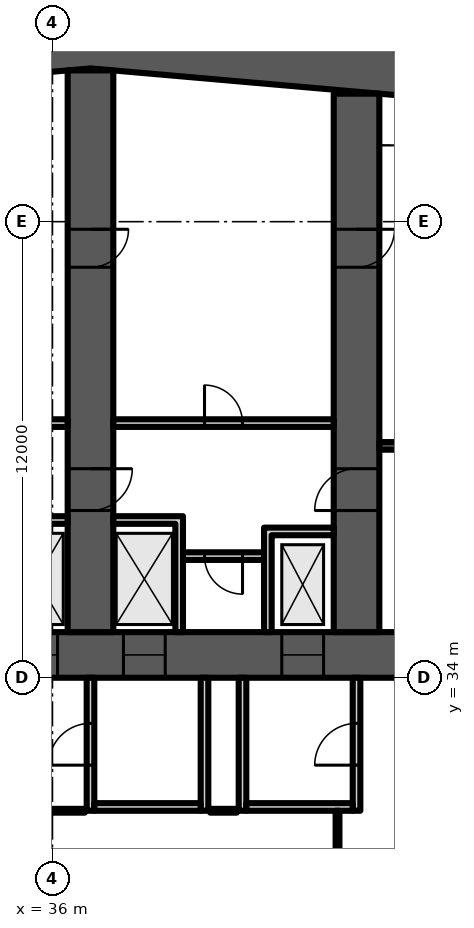
"""IFC4 building model, lengths in metres.
Left out: names, types, materials, properties, quantities, classifications, styles, units other than length and angle.
Written with IfcOpenShell. Run it as: python <this file> out.ifc"""

import sys

from ifc_helpers import new_model, si_unit, direction, frame, frame_2d, origin, place, context, subcontext, project, spatial, polyline, rectangle, outline, extrude, element, fill, save


model = new_model("IFC4")
c1 = context("Model", 3, precision=1e-05, world=origin(), true_north=direction((0.0, 1.0)))
c2 = subcontext(c1, "Body", "Model", "MODEL_VIEW")
j1 = project(units=[si_unit("LENGTHUNIT", "METRE"), si_unit("PLANEANGLEUNIT", "RADIAN")], contexts=[c1])
p1 = place(None, origin())
s1 = spatial("IfcSite", under=j1, at=p1, CompositionType="ELEMENT")
p2 = place(p1, origin())
s2 = spatial("IfcBuilding", under=s1, at=p2, CompositionType="ELEMENT")
p3 = place(p2, frame((0.0, 0.0, 88.3)))
s3 = spatial("IfcBuildingStorey", under=s2, at=p3, CompositionType="ELEMENT", Elevation=88.3)
p4 = place(p3, frame((0.0, 0.0, -0.0)))
e1 = element("IfcWall", 1, at=p4, inside=s3, PredefinedType="SHEAR", context=c2, shape_type="SweptSolid", body=[
    extrude(outline(polyline([(9.0, 47.583), (37.0, 50.032), (65.0, 47.583), (65.0, 48.787), (37.0, 51.237), (9.0, 48.787), (9.0, 47.583)])), origin(), (0.0, 0.0, 1.0), 3.6),
])
p5 = place(p3, frame((9.0, 34.6, 0.0), z_axis=(0.0, 0.0, 1.0), x_axis=(1.0, 0.0, 0.0)))
e2 = element("IfcWall", 2, at=p5, inside=s3, PredefinedType="SHEAR", context=c2, shape_type="SweptSolid", body=[
    extrude(rectangle(XDim=56.0, YDim=1.2, at=frame_2d((28.0, 0.0))), origin(), (0.0, 0.0, 1.0), 3.6),
])
p6 = place(p5, frame((2.0, 0.0, 0.0)))
e3 = element("IfcOpeningElement", 3, at=p6, cuts=e2, PredefinedType="OPENING", context=c2, shape_type="SweptSolid", body=[
    extrude(rectangle(XDim=1.0, YDim=2.1, at=frame_2d((0.5, 1.05))), frame((0.0, 0.61, 0.0), z_axis=(0.0, -1.0, 0.0), x_axis=(1.0, 0.0, 0.0)), (0.0, 0.0, 1.0), 1.22),
])
p7 = place(p5, frame((4.6, 0.0, 0.0)))
e4 = element("IfcOpeningElement", 4, at=p7, cuts=e2, PredefinedType="OPENING", context=c2, shape_type="SweptSolid", body=[
    extrude(rectangle(XDim=1.0, YDim=2.1, at=frame_2d((0.5, 1.05))), frame((0.0, 0.61, 0.0), z_axis=(0.0, -1.0, 0.0), x_axis=(1.0, 0.0, 0.0)), (0.0, 0.0, 1.0), 1.22),
])
p8 = place(p5, frame((7.867, 0.0, 0.0)))
e5 = element("IfcOpeningElement", 5, at=p8, cuts=e2, PredefinedType="OPENING", context=c2, shape_type="SweptSolid", body=[
    extrude(rectangle(XDim=1.1, YDim=2.1, at=frame_2d((0.55, 1.05))), frame((0.0, 0.61, 0.0), z_axis=(0.0, -1.0, 0.0), x_axis=(1.0, 0.0, 0.0)), (0.0, 0.0, 1.0), 1.22),
])
p9 = place(p5, frame((12.033, 0.0, 0.0)))
e6 = element("IfcOpeningElement", 6, at=p9, cuts=e2, PredefinedType="OPENING", context=c2, shape_type="SweptSolid", body=[
    extrude(rectangle(XDim=1.1, YDim=2.1, at=frame_2d((0.55, 1.05))), frame((0.0, 0.61, 0.0), z_axis=(0.0, -1.0, 0.0), x_axis=(1.0, 0.0, 0.0)), (0.0, 0.0, 1.0), 1.22),
])
p10 = place(p5, frame((9.8, 0.0, 0.0)))
e7 = element("IfcOpeningElement", 7, at=p10, cuts=e2, PredefinedType="OPENING", context=c2, shape_type="SweptSolid", body=[
    extrude(rectangle(XDim=1.4, YDim=2.1, at=frame_2d((0.7, 1.05))), frame((0.0, 0.61, 0.0), z_axis=(0.0, -1.0, 0.0), x_axis=(1.0, 0.0, 0.0)), (0.0, 0.0, 1.0), 1.22),
])
p11 = place(p5, frame((14.65, 0.0, 0.0)))
e8 = element("IfcOpeningElement", 8, at=p11, cuts=e2, PredefinedType="OPENING", context=c2, shape_type="SweptSolid", body=[
    extrude(rectangle(XDim=1.2, YDim=2.1, at=frame_2d((0.6, 1.05))), frame((0.0, 0.61, 0.0), z_axis=(0.0, -1.0, 0.0), x_axis=(1.0, 0.0, 0.0)), (0.0, 0.0, 1.0), 1.22),
])
p12 = place(p5, frame((21.867, 0.0, 0.0)))
e9 = element("IfcOpeningElement", 9, at=p12, cuts=e2, PredefinedType="OPENING", context=c2, shape_type="SweptSolid", body=[
    extrude(rectangle(XDim=1.1, YDim=2.1, at=frame_2d((0.55, 1.05))), frame((0.0, 0.61, 0.0), z_axis=(0.0, -1.0, 0.0), x_axis=(1.0, 0.0, 0.0)), (0.0, 0.0, 1.0), 1.22),
])
p13 = place(p5, frame((26.033, 0.0, 0.0)))
e10 = element("IfcOpeningElement", 10, at=p13, cuts=e2, PredefinedType="OPENING", context=c2, shape_type="SweptSolid", body=[
    extrude(rectangle(XDim=1.1, YDim=2.1, at=frame_2d((0.55, 1.05))), frame((0.0, 0.61, 0.0), z_axis=(0.0, -1.0, 0.0), x_axis=(1.0, 0.0, 0.0)), (0.0, 0.0, 1.0), 1.22),
])
p14 = place(p5, frame((23.8, 0.0, 0.0)))
e11 = element("IfcOpeningElement", 11, at=p14, cuts=e2, PredefinedType="OPENING", context=c2, shape_type="SweptSolid", body=[
    extrude(rectangle(XDim=1.4, YDim=2.1, at=frame_2d((0.7, 1.05))), frame((0.0, 0.61, 0.0), z_axis=(0.0, -1.0, 0.0), x_axis=(1.0, 0.0, 0.0)), (0.0, 0.0, 1.0), 1.22),
])
p15 = place(p5, frame((28.867, 0.0, 0.0)))
e12 = element("IfcOpeningElement", 12, at=p15, cuts=e2, PredefinedType="OPENING", context=c2, shape_type="SweptSolid", body=[
    extrude(rectangle(XDim=1.1, YDim=2.1, at=frame_2d((0.55, 1.05))), frame((0.0, 0.61, 0.0), z_axis=(0.0, -1.0, 0.0), x_axis=(1.0, 0.0, 0.0)), (0.0, 0.0, 1.0), 1.22),
])
p16 = place(p5, frame((33.033, 0.0, 0.0)))
e13 = element("IfcOpeningElement", 13, at=p16, cuts=e2, PredefinedType="OPENING", context=c2, shape_type="SweptSolid", body=[
    extrude(rectangle(XDim=1.1, YDim=2.1, at=frame_2d((0.55, 1.05))), frame((0.0, 0.61, 0.0), z_axis=(0.0, -1.0, 0.0), x_axis=(1.0, 0.0, 0.0)), (0.0, 0.0, 1.0), 1.22),
])
p17 = place(p5, frame((40.15, 0.0, 0.0)))
e14 = element("IfcOpeningElement", 14, at=p17, cuts=e2, PredefinedType="OPENING", context=c2, shape_type="SweptSolid", body=[
    extrude(rectangle(XDim=1.2, YDim=2.1, at=frame_2d((0.6, 1.05))), frame((0.0, 0.61, 0.0), z_axis=(0.0, -1.0, 0.0), x_axis=(1.0, 0.0, 0.0)), (0.0, 0.0, 1.0), 1.22),
])
p18 = place(p5, frame((44.8, 0.0, 0.0)))
e15 = element("IfcOpeningElement", 15, at=p18, cuts=e2, PredefinedType="OPENING", context=c2, shape_type="SweptSolid", body=[
    extrude(rectangle(XDim=1.4, YDim=2.1, at=frame_2d((0.7, 1.05))), frame((0.0, 0.61, 0.0), z_axis=(0.0, -1.0, 0.0), x_axis=(1.0, 0.0, 0.0)), (0.0, 0.0, 1.0), 1.22),
])
p19 = place(p5, frame((49.867, 0.0, 0.0)))
e16 = element("IfcOpeningElement", 16, at=p19, cuts=e2, PredefinedType="OPENING", context=c2, shape_type="SweptSolid", body=[
    extrude(rectangle(XDim=1.1, YDim=2.1, at=frame_2d((0.55, 1.05))), frame((0.0, 0.61, 0.0), z_axis=(0.0, -1.0, 0.0), x_axis=(1.0, 0.0, 0.0)), (0.0, 0.0, 1.0), 1.22),
])
p20 = place(p5, frame((53.5, 0.0, 0.0)))
e17 = element("IfcOpeningElement", 17, at=p20, cuts=e2, PredefinedType="OPENING", context=c2, shape_type="SweptSolid", body=[
    extrude(rectangle(XDim=1.1, YDim=2.1, at=frame_2d((0.55, 1.05))), frame((0.0, 0.61, 0.0), z_axis=(0.0, -1.0, 0.0), x_axis=(1.0, 0.0, 0.0)), (0.0, 0.0, 1.0), 1.22),
])
p21 = place(p5, frame((51.567, 0.0, 0.0)))
e18 = element("IfcOpeningElement", 18, at=p21, cuts=e2, PredefinedType="OPENING", context=c2, shape_type="SweptSolid", body=[
    extrude(rectangle(XDim=1.4, YDim=2.1, at=frame_2d((0.7, 1.05))), frame((0.0, 0.61, 0.0), z_axis=(0.0, -1.0, 0.0), x_axis=(1.0, 0.0, 0.0)), (0.0, 0.0, 1.0), 1.22),
])
p22 = place(p3, frame((37.0, 35.2, 0.0), z_axis=(0.0, 0.0, 1.0), x_axis=(0.0, 1.0, 0.0)))
e19 = element("IfcWall", 19, at=p22, inside=s3, PredefinedType="SHEAR", context=c2, shape_type="SweptSolid", body=[
    extrude(rectangle(XDim=14.78, YDim=1.2, at=frame_2d((7.39, 0.0))), origin(), (0.0, 0.0, 1.0), 3.6),
])
p23 = place(p22, frame((3.2, 0.0, 0.0)))
e20 = element("IfcOpeningElement", 20, at=p23, cuts=e19, PredefinedType="OPENING", context=c2, shape_type="SweptSolid", body=[
    extrude(rectangle(XDim=1.1, YDim=2.1, at=frame_2d((0.55, 1.05))), frame((0.0, 0.61, 0.0), z_axis=(0.0, -1.0, 0.0), x_axis=(1.0, 0.0, 0.0)), (0.0, 0.0, 1.0), 1.22),
])
p24 = place(p22, frame((9.6, 0.0, 0.0)))
e21 = element("IfcOpeningElement", 21, at=p24, cuts=e19, PredefinedType="OPENING", context=c2, shape_type="SweptSolid", body=[
    extrude(rectangle(XDim=1.0, YDim=2.1, at=frame_2d((0.5, 1.05))), frame((0.0, 0.61, 0.0), z_axis=(0.0, -1.0, 0.0), x_axis=(1.0, 0.0, 0.0)), (0.0, 0.0, 1.0), 1.22),
])
p25 = place(p3, frame((44.0, 35.2, 0.0), z_axis=(0.0, 0.0, 1.0), x_axis=(0.0, 1.0, 0.0)))
e22 = element("IfcWall", 22, at=p25, inside=s3, PredefinedType="SHEAR", context=c2, shape_type="SweptSolid", body=[
    extrude(rectangle(XDim=14.168, YDim=1.2, at=frame_2d((7.084, 0.0))), origin(), (0.0, 0.0, 1.0), 3.6),
])
p26 = place(p25, frame((3.2, 0.0, 0.0)))
e23 = element("IfcOpeningElement", 23, at=p26, cuts=e22, PredefinedType="OPENING", context=c2, shape_type="SweptSolid", body=[
    extrude(rectangle(XDim=1.1, YDim=2.1, at=frame_2d((0.55, 1.05))), frame((0.0, 0.61, 0.0), z_axis=(0.0, -1.0, 0.0), x_axis=(1.0, 0.0, 0.0)), (0.0, 0.0, 1.0), 1.22),
])
p27 = place(p25, frame((9.6, 0.0, 0.0)))
e24 = element("IfcOpeningElement", 24, at=p27, cuts=e22, PredefinedType="OPENING", context=c2, shape_type="SweptSolid", body=[
    extrude(rectangle(XDim=1.0, YDim=2.1, at=frame_2d((0.5, 1.05))), frame((0.0, 0.61, 0.0), z_axis=(0.0, -1.0, 0.0), x_axis=(1.0, 0.0, 0.0)), (0.0, 0.0, 1.0), 1.22),
])
p28 = place(p3, frame((30.6, 40.7, 0.0), z_axis=(0.0, 0.0, 1.0), x_axis=(1.0, 0.0, 0.0)))
e25 = element("IfcWall", 25, at=p28, inside=s3, PredefinedType="PARTITIONING", context=c2, shape_type="SweptSolid", body=[
    extrude(rectangle(XDim=5.8, YDim=0.2, at=frame_2d((2.9, 0.0))), origin(), (0.0, 0.0, 1.0), 3.15),
])
p29 = place(p28, frame((2.4, 0.0, 0.0)))
e26 = element("IfcOpeningElement", 26, at=p29, cuts=e25, PredefinedType="OPENING", context=c2, shape_type="SweptSolid", body=[
    extrude(rectangle(XDim=1.0, YDim=2.1, at=frame_2d((0.5, 1.05))), frame((0.0, 0.11, 0.0), z_axis=(0.0, -1.0, 0.0), x_axis=(1.0, 0.0, 0.0)), (0.0, 0.0, 1.0), 0.22),
])
p30 = place(p3, frame((0.0, 0.0, -0.0)))
e27 = element("IfcWall", 27, at=p30, inside=s3, PredefinedType="PARTITIONING", context=c2, shape_type="SweptSolid", body=[
    extrude(outline(polyline([(34.567, 38.25), (34.767, 38.25), (36.4, 38.25), (36.4, 38.05), (34.767, 38.05), (34.767, 35.2), (34.567, 35.2), (34.567, 38.25)])), origin(), (0.0, 0.0, 1.0), 3.15),
])
p31 = place(p3, frame((39.433, 37.2, 0.0), z_axis=(0.0, 0.0, 1.0), x_axis=(1.0, 0.0, 0.0)))
e28 = element("IfcWall", 28, at=p31, inside=s3, PredefinedType="PARTITIONING", context=c2, shape_type="SweptSolid", body=[
    extrude(rectangle(XDim=2.133, YDim=0.2, at=frame_2d((1.067, 0.0))), origin(), (0.0, 0.0, 1.0), 3.15),
])
p32 = place(p31, frame((0.567, 0.0, 0.0)))
e29 = element("IfcOpeningElement", 29, at=p32, cuts=e28, PredefinedType="OPENING", context=c2, shape_type="SweptSolid", body=[
    extrude(rectangle(XDim=1.0, YDim=2.1, at=frame_2d((0.5, 1.05))), frame((0.0, 0.11, 0.0), z_axis=(0.0, -1.0, 0.0), x_axis=(1.0, 0.0, 0.0)), (0.0, 0.0, 1.0), 0.22),
])
p33 = place(p3, frame((37.6, 40.7, 0.0), z_axis=(0.0, 0.0, 1.0), x_axis=(1.0, 0.0, 0.0)))
e30 = element("IfcWall", 30, at=p33, inside=s3, PredefinedType="PARTITIONING", context=c2, shape_type="SweptSolid", body=[
    extrude(rectangle(XDim=5.8, YDim=0.2, at=frame_2d((2.9, 0.0))), origin(), (0.0, 0.0, 1.0), 3.15),
])
p34 = place(p33, frame((2.4, 0.0, 0.0)))
e31 = element("IfcOpeningElement", 31, at=p34, cuts=e30, PredefinedType="OPENING", context=c2, shape_type="SweptSolid", body=[
    extrude(rectangle(XDim=1.0, YDim=2.1, at=frame_2d((0.5, 1.05))), frame((0.0, 0.11, 0.0), z_axis=(0.0, -1.0, 0.0), x_axis=(1.0, 0.0, 0.0)), (0.0, 0.0, 1.0), 0.22),
])
p35 = place(p3, frame((0.0, 0.0, -0.0)))
e32 = element("IfcWall", 32, at=p35, inside=s3, PredefinedType="PARTITIONING", context=c2, shape_type="SweptSolid", body=[
    extrude(outline(polyline([(41.567, 37.95), (41.767, 37.95), (43.4, 37.95), (43.4, 37.75), (41.767, 37.75), (41.767, 35.2), (41.567, 35.2), (41.567, 37.95)])), origin(), (0.0, 0.0, 1.0), 3.15),
])
p36 = place(p3, frame((0.0, 0.0, -0.0)))
e33 = element("IfcWall", 33, at=p36, inside=s3, PredefinedType="PARTITIONING", context=c2, shape_type="SweptSolid", body=[
    extrude(outline(polyline([(39.233, 38.05), (37.6, 38.05), (37.6, 38.25), (39.233, 38.25), (39.433, 38.25), (39.433, 35.2), (39.233, 35.2), (39.233, 38.05)])), origin(), (0.0, 0.0, 1.0), 3.15),
])
p37 = place(p3, frame((44.6, 40.1, 0.0), z_axis=(0.0, 0.0, 1.0), x_axis=(1.0, 0.0, 0.0)))
e34 = element("IfcWall", 34, at=p37, inside=s3, PredefinedType="SHEAR", context=c2, shape_type="SweptSolid", body=[
    extrude(rectangle(XDim=5.8, YDim=0.2, at=frame_2d((2.9, 0.0))), origin(), (0.0, 0.0, 1.0), 3.15),
])
p38 = place(p37, frame((3.325, 0.0, 0.0)))
e35 = element("IfcOpeningElement", 35, at=p38, cuts=e34, PredefinedType="OPENING", context=c2, shape_type="SweptSolid", body=[
    extrude(rectangle(XDim=1.2, YDim=2.1, at=frame_2d((0.6, 1.05))), frame((0.0, 0.11, 0.0), z_axis=(0.0, -1.0, 0.0), x_axis=(1.0, 0.0, 0.0)), (0.0, 0.0, 1.0), 0.22),
])
p39 = place(p37, frame((0.475, 0.0, 0.0)))
e36 = element("IfcOpeningElement", 36, at=p39, cuts=e34, PredefinedType="OPENING", context=c2, shape_type="SweptSolid", body=[
    extrude(rectangle(XDim=0.9, YDim=2.1, at=frame_2d((0.45, 1.05))), frame((0.0, 0.11, 0.0), z_axis=(0.0, -1.0, 0.0), x_axis=(1.0, 0.0, 0.0)), (0.0, 0.0, 1.0), 0.22),
])
p40 = place(p3, frame((37.0, 30.5, 0.0), z_axis=(0.0, 0.0, 1.0), x_axis=(0.0, 1.0, 0.0)))
e37 = element("IfcWall", 37, at=p40, inside=s3, PredefinedType="PARTITIONING", context=c2, shape_type="SweptSolid", body=[
    extrude(rectangle(XDim=3.5, YDim=0.2, at=frame_2d((1.75, 0.0))), origin(), (0.0, 0.0, 1.0), 3.15),
])
p41 = place(p40, frame((1.2, 0.0, 0.0)))
e38 = element("IfcOpeningElement", 38, at=p41, cuts=e37, PredefinedType="OPENING", context=c2, shape_type="SweptSolid", body=[
    extrude(rectangle(XDim=1.1, YDim=2.1, at=frame_2d((0.55, 1.05))), frame((0.0, 0.11, 0.0), z_axis=(0.0, -1.0, 0.0), x_axis=(1.0, 0.0, 0.0)), (0.0, 0.0, 1.0), 0.22),
])
p42 = place(p3, frame((40.0, 30.5, 0.0), z_axis=(0.0, 0.0, 1.0), x_axis=(0.0, 1.0, 0.0)))
e39 = element("IfcWall", 39, at=p42, inside=s3, PredefinedType="PARTITIONING", context=c2, shape_type="SweptSolid", body=[
    extrude(rectangle(XDim=3.5, YDim=0.2, at=frame_2d((1.75, 0.0))), origin(), (0.0, 0.0, 1.0), 3.15),
])
p43 = place(p3, frame((37.1, 30.6, 0.0), z_axis=(0.0, 0.0, 1.0), x_axis=(1.0, 0.0, 0.0)))
e40 = element("IfcWall", 40, at=p43, inside=s3, PredefinedType="PARTITIONING", context=c2, shape_type="SweptSolid", body=[
    extrude(rectangle(XDim=2.8, YDim=0.2, at=frame_2d((1.4, 0.0))), origin(), (0.0, 0.0, 1.0), 3.15),
])
p44 = place(p3, frame((41.0, 30.5, 0.0), z_axis=(0.0, 0.0, 1.0), x_axis=(0.0, 1.0, 0.0)))
e41 = element("IfcWall", 41, at=p44, inside=s3, PredefinedType="PARTITIONING", context=c2, shape_type="SweptSolid", body=[
    extrude(rectangle(XDim=3.5, YDim=0.2, at=frame_2d((1.75, 0.0))), origin(), (0.0, 0.0, 1.0), 3.15),
])
p45 = place(p3, frame((44.0, 30.5, 0.0), z_axis=(0.0, 0.0, 1.0), x_axis=(0.0, 1.0, 0.0)))
e42 = element("IfcWall", 42, at=p45, inside=s3, PredefinedType="PARTITIONING", context=c2, shape_type="SweptSolid", body=[
    extrude(rectangle(XDim=3.5, YDim=0.2, at=frame_2d((1.75, 0.0))), origin(), (0.0, 0.0, 1.0), 3.15),
])
p46 = place(p45, frame((1.2, 0.0, 0.0)))
e43 = element("IfcOpeningElement", 43, at=p46, cuts=e42, PredefinedType="OPENING", context=c2, shape_type="SweptSolid", body=[
    extrude(rectangle(XDim=1.1, YDim=2.1, at=frame_2d((0.55, 1.05))), frame((0.0, 0.11, 0.0), z_axis=(0.0, -1.0, 0.0), x_axis=(1.0, 0.0, 0.0)), (0.0, 0.0, 1.0), 0.22),
])
p47 = place(p3, frame((41.1, 30.6, 0.0), z_axis=(0.0, 0.0, 1.0), x_axis=(1.0, 0.0, 0.0)))
e44 = element("IfcWall", 44, at=p47, inside=s3, PredefinedType="PARTITIONING", context=c2, shape_type="SweptSolid", body=[
    extrude(rectangle(XDim=2.8, YDim=0.2, at=frame_2d((1.4, 0.0))), origin(), (0.0, 0.0, 1.0), 3.15),
])
p48 = place(p3, frame((9.0, 30.5, 0.0), z_axis=(0.0, 0.0, 1.0), x_axis=(1.0, 0.0, 0.0)))
e45 = element("IfcWall", 45, at=p48, inside=s3, PredefinedType="PARTITIONING", context=c2, shape_type="SweptSolid", body=[
    extrude(rectangle(XDim=27.85, YDim=0.1, at=frame_2d((13.925, 0.0))), origin(), (0.0, 0.0, 1.0), 3.15),
])
p49 = place(p48, frame((14.52, 0.0, 0.0)))
e46 = element("IfcOpeningElement", 46, at=p49, cuts=e45, PredefinedType="OPENING", context=c2, shape_type="SweptSolid", body=[
    extrude(rectangle(XDim=1.0, YDim=2.1, at=frame_2d((0.5, 1.05))), frame((0.0, 0.06, 0.0), z_axis=(0.0, -1.0, 0.0), x_axis=(1.0, 0.0, 0.0)), (0.0, 0.0, 1.0), 0.12),
])
p50 = place(p3, frame((43.5, 14.93, 0.0), z_axis=(0.0, 0.0, 1.0), x_axis=(0.0, 1.0, 0.0)))
e47 = element("IfcWall", 47, at=p50, inside=s3, PredefinedType="PARTITIONING", context=c2, shape_type="SweptSolid", body=[
    extrude(rectangle(XDim=15.57, YDim=0.1, at=frame_2d((7.785, 0.0))), origin(), (0.0, 0.0, 1.0), 3.15),
])
p51 = place(p50, frame((2.45, 0.0, 0.0)))
e48 = element("IfcOpeningElement", 48, at=p51, cuts=e47, PredefinedType="OPENING", context=c2, shape_type="SweptSolid", body=[
    extrude(rectangle(XDim=1.8, YDim=2.1, at=frame_2d((0.9, 1.05))), frame((0.0, 0.06, 0.0), z_axis=(0.0, -1.0, 0.0), x_axis=(1.0, 0.0, 0.0)), (0.0, 0.0, 1.0), 0.12),
])
p52 = place(p3, frame((40.15, 30.5, 0.0), z_axis=(0.0, 0.0, 1.0), x_axis=(1.0, 0.0, 0.0)))
e49 = element("IfcWall", 49, at=p52, inside=s3, PredefinedType="PARTITIONING", context=c2, shape_type="SweptSolid", body=[
    extrude(rectangle(XDim=0.7, YDim=0.1, at=frame_2d((0.35, 0.0))), origin(), (0.0, 0.0, 1.0), 3.15),
])
p53 = place(p13, origin())
e50 = element("IfcDoor", 50, at=p53, inside=s3, OperationType="DOUBLE_DOOR_SLIDING", PredefinedType="DOOR", context=c2, shape_type="SweptSolid", body=[
    extrude(rectangle(XDim=1.1, YDim=2.1, at=frame_2d((0.55, 1.05))), frame((0.0, 0.025, 0.0), z_axis=(0.0, -1.0, 0.0), x_axis=(1.0, 0.0, 0.0)), (0.0, 0.0, 1.0), 0.05),
])
fill(e10, e50)
p54 = place(p32, origin())
e51 = element("IfcDoor", 51, at=p54, inside=s3, OperationType="SINGLE_SWING_RIGHT", PredefinedType="DOOR", context=c2, shape_type="SweptSolid", body=[
    extrude(rectangle(XDim=1.0, YDim=2.1, at=frame_2d((0.5, 1.05))), frame((0.0, 0.025, 0.0), z_axis=(0.0, -1.0, 0.0), x_axis=(1.0, 0.0, 0.0)), (0.0, 0.0, 1.0), 0.05),
])
fill(e29, e51)
p55 = place(p15, origin())
e52 = element("IfcDoor", 52, at=p55, inside=s3, OperationType="DOUBLE_DOOR_SLIDING", PredefinedType="DOOR", context=c2, shape_type="SweptSolid", body=[
    extrude(rectangle(XDim=1.1, YDim=2.1, at=frame_2d((0.55, 1.05))), frame((0.0, 0.025, 0.0), z_axis=(0.0, -1.0, 0.0), x_axis=(1.0, 0.0, 0.0)), (0.0, 0.0, 1.0), 0.05),
])
fill(e12, e52)
p56 = place(p16, origin())
e53 = element("IfcDoor", 53, at=p56, inside=s3, OperationType="DOUBLE_DOOR_SLIDING", PredefinedType="DOOR", context=c2, shape_type="SweptSolid", body=[
    extrude(rectangle(XDim=1.1, YDim=2.1, at=frame_2d((0.55, 1.05))), frame((0.0, 0.025, 0.0), z_axis=(0.0, -1.0, 0.0), x_axis=(1.0, 0.0, 0.0)), (0.0, 0.0, 1.0), 0.05),
])
fill(e13, e53)
p57 = place(p34, origin())
e54 = element("IfcDoor", 54, at=p57, inside=s3, OperationType="SINGLE_SWING_LEFT", PredefinedType="DOOR", context=c2, shape_type="SweptSolid", body=[
    extrude(rectangle(XDim=1.0, YDim=2.1, at=frame_2d((0.5, 1.05))), frame((0.0, 0.025, 0.0), z_axis=(0.0, -1.0, 0.0), x_axis=(1.0, 0.0, 0.0)), (0.0, 0.0, 1.0), 0.05),
])
fill(e31, e54)
p58 = place(p23, origin())
e55 = element("IfcDoor", 55, at=p58, inside=s3, OperationType="SINGLE_SWING_RIGHT", PredefinedType="DOOR", context=c2, shape_type="SweptSolid", body=[
    extrude(rectangle(XDim=1.1, YDim=2.1, at=frame_2d((0.55, 1.05))), frame((0.0, 0.025, 0.0), z_axis=(0.0, -1.0, 0.0), x_axis=(1.0, 0.0, 0.0)), (0.0, 0.0, 1.0), 0.05),
])
fill(e20, e55)
p59 = place(p24, origin())
e56 = element("IfcDoor", 56, at=p59, inside=s3, OperationType="SINGLE_SWING_RIGHT", PredefinedType="DOOR", context=c2, shape_type="SweptSolid", body=[
    extrude(rectangle(XDim=1.0, YDim=2.1, at=frame_2d((0.5, 1.05))), frame((0.0, 0.6, 0.0), z_axis=(0.0, -1.0, 0.0), x_axis=(1.0, 0.0, 0.0)), (0.0, 0.0, 1.0), 1.199),
])
fill(e21, e56)
p60 = place(p26, origin())
e57 = element("IfcDoor", 57, at=p60, inside=s3, OperationType="SINGLE_SWING_LEFT", PredefinedType="DOOR", context=c2, shape_type="SweptSolid", body=[
    extrude(rectangle(XDim=1.1, YDim=2.1, at=frame_2d((0.55, 1.05))), frame((0.0, 0.025, 0.0), z_axis=(0.0, -1.0, 0.0), x_axis=(1.0, 0.0, 0.0)), (0.0, 0.0, 1.0), 0.05),
])
fill(e23, e57)
p61 = place(p27, origin())
e58 = element("IfcDoor", 58, at=p61, inside=s3, OperationType="SINGLE_SWING_RIGHT", PredefinedType="DOOR", context=c2, shape_type="SweptSolid", body=[
    extrude(rectangle(XDim=1.0, YDim=2.1, at=frame_2d((0.5, 1.05))), frame((0.0, 0.6, 0.0), z_axis=(0.0, -1.0, 0.0), x_axis=(1.0, 0.0, 0.0)), (0.0, 0.0, 1.0), 1.199),
])
fill(e24, e58)
p62 = place(p41, origin())
e59 = element("IfcDoor", 59, at=p62, inside=s3, OperationType="SINGLE_SWING_LEFT", PredefinedType="DOOR", context=c2, shape_type="SweptSolid", body=[
    extrude(rectangle(XDim=1.1, YDim=2.1, at=frame_2d((0.55, 1.05))), frame((0.0, 0.025, 0.0), z_axis=(0.0, -1.0, 0.0), x_axis=(1.0, 0.0, 0.0)), (0.0, 0.0, 1.0), 0.05),
])
fill(e38, e59)
p63 = place(p46, origin())
e60 = element("IfcDoor", 60, at=p63, inside=s3, OperationType="SINGLE_SWING_LEFT", PredefinedType="DOOR", context=c2, shape_type="SweptSolid", body=[
    extrude(rectangle(XDim=1.1, YDim=2.1, at=frame_2d((0.55, 1.05))), frame((0.0, 0.025, 0.0), z_axis=(0.0, -1.0, 0.0), x_axis=(1.0, 0.0, 0.0)), (0.0, 0.0, 1.0), 0.05),
])
fill(e43, e60)
save(model, sys.argv[1])
